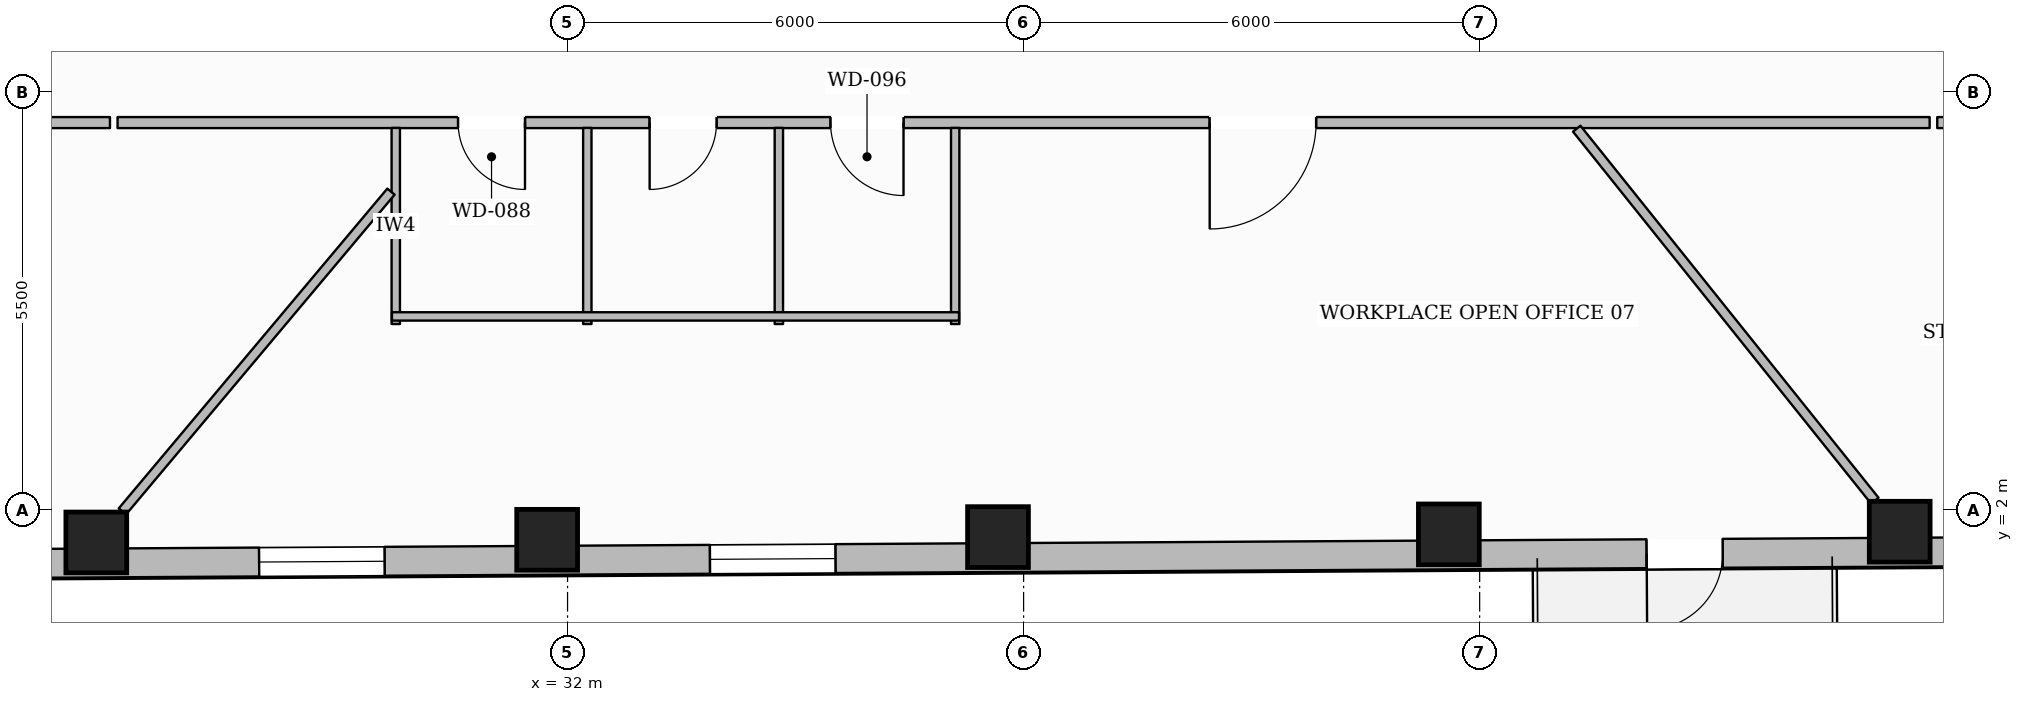
"""IFC4 building model, lengths in metres.
Left out: names, types, materials, properties, quantities, classifications, styles, units other than length and angle.
Written with IfcOpenShell. Run it as: python <this file> out.ifc"""

import sys

from ifc_helpers import new_model, si_unit, direction, frame, frame_2d, origin, origin_2d, place, context, subcontext, project, spatial, rectangle, hollow_rectangle, extrude, element, fill, save


model = new_model("IFC4")
c1 = context("Model", 3, precision=1e-05, world=origin(), true_north=direction((0.0, 1.0)))
c2 = subcontext(c1, "Body", "Model", "MODEL_VIEW")
j1 = project(units=[si_unit("LENGTHUNIT", "METRE"), si_unit("PLANEANGLEUNIT", "RADIAN")], contexts=[c1])
p1 = place(None, origin())
s1 = spatial("IfcSite", under=j1, at=p1, CompositionType="ELEMENT")
p2 = place(p1, origin())
s2 = spatial("IfcBuilding", under=s1, at=p2, CompositionType="ELEMENT")
p3 = place(p2, frame((0.0, 0.0, 71.45)))
s3 = spatial("IfcBuildingStorey", under=s2, at=p3, CompositionType="ELEMENT", Elevation=71.45)
for number, where, z_axis, x_axis in (
    (1, (25.8, 1.576, 0.0), (0.0, 0.0, 1.0), (1.0, 0.0, 0.0)),
    (2, (31.732, 1.611, 0.0), (0.0, 0.0, 1.0), (1.0, 0.0, 0.0)),
    (3, (37.663, 1.647, 0.0), (0.0, 0.0, 1.0), (1.0, 0.0, 0.0)),
    (4, (43.594, 1.682, 0.0), (0.0, 0.0, 1.0), (1.0, 0.0, 0.0)),
    (5, (49.526, 1.718, 0.0), (0.0, 0.0, 1.0), (1.0, 0.0, 0.0)),
):
    element("IfcColumn", number, at=place(p3, frame(where, z_axis=z_axis, x_axis=x_axis)), inside=s3, PredefinedType="COLUMN", context=c2, shape_type="SweptSolid", body=[
        extrude(hollow_rectangle(XDim=0.8, YDim=0.8, WallThickness=0.036, at=origin_2d()), origin(), (0.0, 0.0, 1.0), 3.43),
    ])
p4 = place(p3, frame((55.933, 1.486, 0.0), z_axis=(0.0, 0.0, 1.0), x_axis=(-0.999982241707, -0.005959552889, 0.0)))
e6 = element("IfcWall", 6, at=p4, inside=s3, PredefinedType="STANDARD", context=c2, shape_type="SweptSolid", body=[
    extrude(rectangle(XDim=36.542, YDim=0.38, at=frame_2d((18.271, 0.0))), origin(), (0.0, 0.0, 1.0), 2.81),
])
p5 = place(p4, frame((8.736, 0.0, 0.0)))
e7 = element("IfcOpeningElement", 7, at=p5, cuts=e6, PredefinedType="OPENING", context=c2, shape_type="SweptSolid", body=[
    extrude(rectangle(XDim=1.0, YDim=2.2, at=frame_2d((0.5, 1.1))), frame((0.0, 0.2, 0.0), z_axis=(0.0, -1.0, 0.0), x_axis=(1.0, 0.0, 0.0)), (0.0, 0.0, 1.0), 0.4),
])
p6 = place(p4, frame((32.272, 0.0, 0.55)))
e8 = element("IfcOpeningElement", 8, at=p6, cuts=e6, PredefinedType="OPENING", context=c2, shape_type="SweptSolid", body=[
    extrude(rectangle(XDim=1.65, YDim=1.6, at=frame_2d((0.825, 0.8))), frame((0.0, 0.2, 0.0), z_axis=(0.0, -1.0, 0.0), x_axis=(1.0, 0.0, 0.0)), (0.0, 0.0, 1.0), 0.4),
])
p7 = place(p4, frame((26.34, 0.0, 0.55)))
e9 = element("IfcOpeningElement", 9, at=p7, cuts=e6, PredefinedType="OPENING", context=c2, shape_type="SweptSolid", body=[
    extrude(rectangle(XDim=1.65, YDim=1.6, at=frame_2d((0.825, 0.8))), frame((0.0, 0.2, 0.0), z_axis=(0.0, -1.0, 0.0), x_axis=(1.0, 0.0, 0.0)), (0.0, 0.0, 1.0), 0.4),
])
p8 = place(p4, frame((20.409, 0.0, 0.55)))
e10 = element("IfcOpeningElement", 10, at=p8, cuts=e6, PredefinedType="OPENING", context=c2, shape_type="SweptSolid", body=[
    extrude(rectangle(XDim=1.65, YDim=1.6, at=frame_2d((0.825, 0.8))), frame((0.0, 0.2, 0.0), z_axis=(0.0, -1.0, 0.0), x_axis=(1.0, 0.0, 0.0)), (0.0, 0.0, 1.0), 0.4),
])
p9 = place(p4, frame((2.615, 0.0, 0.55)))
e11 = element("IfcOpeningElement", 11, at=p9, cuts=e6, PredefinedType="OPENING", context=c2, shape_type="SweptSolid", body=[
    extrude(rectangle(XDim=1.65, YDim=1.6, at=frame_2d((0.825, 0.8))), frame((0.0, 0.2, 0.0), z_axis=(0.0, -1.0, 0.0), x_axis=(1.0, 0.0, 0.0)), (0.0, 0.0, 1.0), 0.4),
])
p10 = place(p3, frame((56.518, 7.1, 0.0), z_axis=(0.0, 0.0, 1.0), x_axis=(-1.0, 0.0, 0.0)))
e12 = element("IfcWall", 12, at=p10, inside=s3, PredefinedType="PARTITIONING", context=c2, shape_type="SweptSolid", body=[
    extrude(rectangle(XDim=6.498, YDim=0.145, at=frame_2d((3.249, 0.0))), origin(), (0.0, 0.0, 1.0), 3.43),
])
p11 = place(p3, frame((49.92, 7.1, 0.0), z_axis=(0.0, 0.0, 1.0), x_axis=(-1.0, 0.0, 0.0)))
e13 = element("IfcWall", 13, at=p11, inside=s3, PredefinedType="PARTITIONING", context=c2, shape_type="SweptSolid", body=[
    extrude(rectangle(XDim=23.84, YDim=0.145, at=frame_2d((11.92, 0.0))), origin(), (0.0, 0.0, 1.0), 3.118),
])
p12 = place(p11, frame((18.48, 0.0, 0.0)))
e14 = element("IfcOpeningElement", 14, at=p12, cuts=e13, PredefinedType="OPENING", context=c2, shape_type="SweptSolid", body=[
    extrude(rectangle(XDim=0.88, YDim=2.1, at=frame_2d((0.44, 1.05))), frame((0.0, 0.083, 0.0), z_axis=(0.0, -1.0, 0.0), x_axis=(1.0, 0.0, 0.0)), (0.0, 0.0, 1.0), 0.165),
])
p13 = place(p11, frame((15.96, 0.0, 0.0)))
e15 = element("IfcOpeningElement", 15, at=p13, cuts=e13, PredefinedType="OPENING", context=c2, shape_type="SweptSolid", body=[
    extrude(rectangle(XDim=0.88, YDim=2.1, at=frame_2d((0.44, 1.05))), frame((0.0, 0.083, 0.0), z_axis=(0.0, -1.0, 0.0), x_axis=(1.0, 0.0, 0.0)), (0.0, 0.0, 1.0), 0.165),
])
p14 = place(p11, frame((13.5, 0.0, 0.0)))
e16 = element("IfcOpeningElement", 16, at=p14, cuts=e13, PredefinedType="OPENING", context=c2, shape_type="SweptSolid", body=[
    extrude(rectangle(XDim=0.96, YDim=2.1, at=frame_2d((0.48, 1.05))), frame((0.0, 0.083, 0.0), z_axis=(0.0, -1.0, 0.0), x_axis=(1.0, 0.0, 0.0)), (0.0, 0.0, 1.0), 0.165),
])
p15 = place(p11, frame((8.072, 0.0, 0.0)))
e17 = element("IfcOpeningElement", 17, at=p15, cuts=e13, PredefinedType="OPENING", context=c2, shape_type="SweptSolid", body=[
    extrude(rectangle(XDim=1.4, YDim=2.2, at=frame_2d((0.7, 1.1))), frame((0.0, 0.083, 0.0), z_axis=(0.0, -1.0, 0.0), x_axis=(1.0, 0.0, 0.0)), (0.0, 0.0, 1.0), 0.165),
])
p16 = place(p3, frame((25.98, 7.1, 0.0), z_axis=(0.0, 0.0, 1.0), x_axis=(-1.0, 0.0, 0.0)))
e18 = element("IfcWall", 18, at=p16, inside=s3, PredefinedType="PARTITIONING", context=c2, shape_type="SweptSolid", body=[
    extrude(rectangle(XDim=7.247, YDim=0.145, at=frame_2d((3.624, 0.0))), origin(), (0.0, 0.0, 1.0), 3.43),
])
for number, where, z_axis, x_axis in (
    (19, (29.74, 4.45, 0.0), (0.0, 0.0, 1.0), (0.0, 1.0, 0.0)),
    (20, (32.26, 4.45, 0.0), (0.0, 0.0, 1.0), (0.0, 1.0, 0.0)),
    (21, (34.78, 4.45, 0.0), (0.0, 0.0, 1.0), (0.0, 1.0, 0.0)),
    (22, (37.1, 4.45, 0.0), (0.0, 0.0, 1.0), (0.0, 1.0, 0.0)),
):
    element("IfcWall", number, at=place(p3, frame(where, z_axis=z_axis, x_axis=x_axis)), inside=s3, PredefinedType="PLUMBINGWALL", context=c2, shape_type="SweptSolid", body=[
        extrude(rectangle(XDim=2.58, YDim=0.11, at=frame_2d((1.29, 0.0))), origin(), (0.0, 0.0, 1.0), 3.43),
    ])
p17 = place(p3, frame((29.69, 4.55, 0.0), z_axis=(0.0, 0.0, 1.0), x_axis=(1.0, 0.0, 0.0)))
e23 = element("IfcWall", 23, at=p17, inside=s3, PredefinedType="PLUMBINGWALL", context=c2, shape_type="SweptSolid", body=[
    extrude(rectangle(XDim=7.46, YDim=0.11, at=frame_2d((3.73, 0.0))), origin(), (0.0, 0.0, 1.0), 3.43),
])
p18 = place(p3, frame((29.677, 6.191, 0.0), z_axis=(0.0, 0.0, 1.0), x_axis=(-0.64317332917, -0.76572062049, 0.0)))
e24 = element("IfcWall", 24, at=p18, inside=s3, PredefinedType="PARTITIONING", context=c2, shape_type="SweptSolid", body=[
    extrude(rectangle(XDim=5.495, YDim=0.125, at=frame_2d((2.747, 0.0))), origin(), (0.0, 0.0, 1.0), 3.43),
])
p19 = place(p3, frame((45.277, 7.02, 0.0), z_axis=(0.0, 0.0, 1.0), x_axis=(0.62534047026, -0.780352033543, 0.0)))
e25 = element("IfcWall", 25, at=p19, inside=s3, PredefinedType="PARTITIONING", context=c2, shape_type="SweptSolid", body=[
    extrude(rectangle(XDim=6.271, YDim=0.125, at=frame_2d((3.136, 0.0))), origin(), (0.0, 0.0, 1.0), 3.43),
])
p20 = place(p5, origin())
e26 = element("IfcDoor", 26, at=p20, inside=s3, OperationType="SINGLE_SWING_RIGHT", PredefinedType="DOOR", context=c2, shape_type="SweptSolid", body=[
    extrude(rectangle(XDim=1.0, YDim=2.2, at=frame_2d((0.5, 1.1))), frame((0.0, 0.025, 0.0), z_axis=(0.0, -1.0, 0.0), x_axis=(1.0, 0.0, 0.0)), (0.0, 0.0, 1.0), 0.05),
])
fill(e7, e26)
p21 = place(p7, origin())
e27 = element("IfcWindow", 27, at=p21, inside=s3, PartitioningType="SINGLE_PANEL", PredefinedType="WINDOW", context=c2, shape_type="SweptSolid", body=[
    extrude(rectangle(XDim=1.65, YDim=1.6, at=frame_2d((0.825, 0.8))), frame((0.0, 0.03, 0.0), z_axis=(0.0, -1.0, 0.0), x_axis=(1.0, 0.0, 0.0)), (0.0, 0.0, 1.0), 0.06),
])
fill(e9, e27)
p22 = place(p8, origin())
e28 = element("IfcWindow", 28, at=p22, inside=s3, PartitioningType="SINGLE_PANEL", PredefinedType="WINDOW", context=c2, shape_type="SweptSolid", body=[
    extrude(rectangle(XDim=1.65, YDim=1.6, at=frame_2d((0.825, 0.8))), frame((0.0, 0.03, 0.0), z_axis=(0.0, -1.0, 0.0), x_axis=(1.0, 0.0, 0.0)), (0.0, 0.0, 1.0), 0.06),
])
fill(e10, e28)
p23 = place(p12, origin())
e29 = element("IfcDoor", 29, at=p23, inside=s3, OperationType="SINGLE_SWING_LEFT", PredefinedType="DOOR", context=c2, shape_type="SweptSolid", body=[
    extrude(rectangle(XDim=0.88, YDim=2.1, at=frame_2d((0.44, 1.05))), frame((0.0, 0.025, 0.0), z_axis=(0.0, -1.0, 0.0), x_axis=(1.0, 0.0, 0.0)), (0.0, 0.0, 1.0), 0.05),
])
fill(e14, e29)
p24 = place(p13, origin())
e30 = element("IfcDoor", 30, at=p24, inside=s3, OperationType="SINGLE_SWING_RIGHT", PredefinedType="DOOR", context=c2, shape_type="SweptSolid", body=[
    extrude(rectangle(XDim=0.88, YDim=2.1, at=frame_2d((0.44, 1.05))), frame((0.0, 0.025, 0.0), z_axis=(0.0, -1.0, 0.0), x_axis=(1.0, 0.0, 0.0)), (0.0, 0.0, 1.0), 0.05),
])
fill(e15, e30)
p25 = place(p14, origin())
e31 = element("IfcDoor", 31, at=p25, inside=s3, OperationType="SINGLE_SWING_LEFT", PredefinedType="DOOR", context=c2, shape_type="SweptSolid", body=[
    extrude(rectangle(XDim=0.96, YDim=2.1, at=frame_2d((0.48, 1.05))), frame((0.0, 0.025, 0.0), z_axis=(0.0, -1.0, 0.0), x_axis=(1.0, 0.0, 0.0)), (0.0, 0.0, 1.0), 0.05),
])
fill(e16, e31)
p26 = place(p15, origin())
e32 = element("IfcDoor", 32, at=p26, inside=s3, OperationType="SINGLE_SWING_RIGHT", PredefinedType="DOOR", context=c2, shape_type="SweptSolid", body=[
    extrude(rectangle(XDim=1.4, YDim=2.2, at=frame_2d((0.7, 1.1))), frame((0.0, 0.025, 0.0), z_axis=(0.0, -1.0, 0.0), x_axis=(1.0, 0.0, 0.0)), (0.0, 0.0, 1.0), 0.05),
])
fill(e17, e32)
save(model, sys.argv[1])
